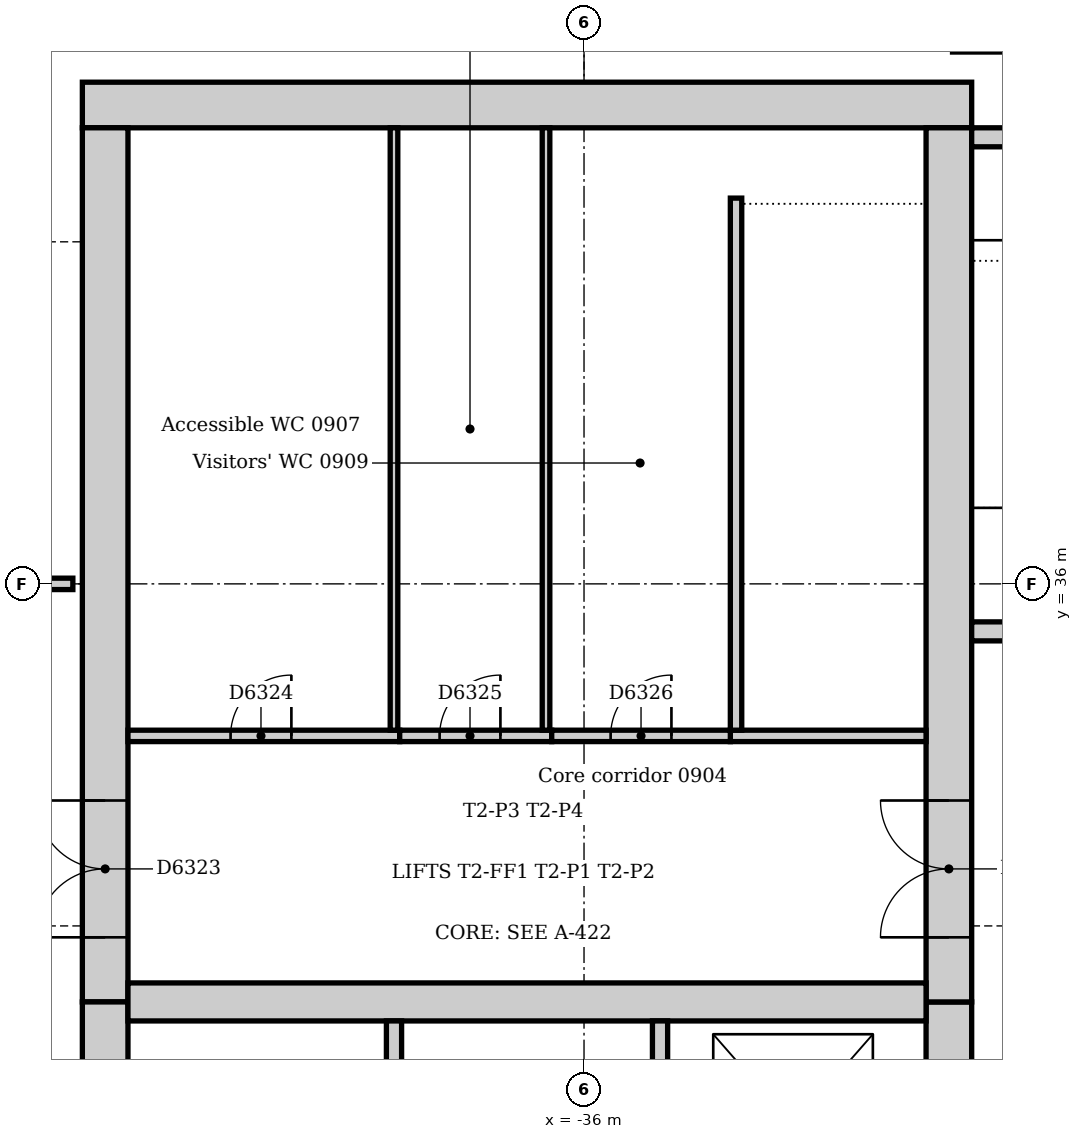
"""IFC4 building model, lengths in metres.
Left out: names, types, materials, properties, quantities, classifications, styles, units other than length and angle.
Written with IfcOpenShell. Run it as: python <this file> out.ifc"""

import sys

from ifc_helpers import new_model, si_unit, direction, frame, frame_2d, origin, origin_2d, place, context, subcontext, project, spatial, rectangle, extrude, element, fill, save


model = new_model("IFC4")
c1 = context("Model", 3, precision=1e-05, world=origin(), true_north=direction((0.0, 1.0)))
c2 = subcontext(c1, "Body", "Model", "MODEL_VIEW")
j1 = project(units=[si_unit("LENGTHUNIT", "METRE"), si_unit("PLANEANGLEUNIT", "RADIAN")], contexts=[c1])
p1 = place(None, origin())
s1 = spatial("IfcSite", under=j1, at=p1, CompositionType="ELEMENT")
p2 = place(p1, origin())
s2 = spatial("IfcBuilding", under=s1, at=p2, CompositionType="ELEMENT")
p3 = place(p2, frame((0.0, 0.0, 42.0)))
s3 = spatial("IfcBuildingStorey", under=s2, at=p3, CompositionType="ELEMENT", Elevation=42.0)
p4 = place(p3, frame((-30.9, 42.3, 0.0), z_axis=(0.0, 0.0, 1.0), x_axis=(-1.0, 0.0, 0.0)))
e1 = element("IfcWall", 1, at=p4, inside=s3, PredefinedType="SOLIDWALL", context=c2, shape_type="SweptSolid", body=[
    extrude(rectangle(XDim=11.7, YDim=0.6, at=frame_2d((5.85, 0.0))), origin(), (0.0, 0.0, 1.0), 4.0),
])
p5 = place(p3, frame((-31.2, 21.0, 0.0), z_axis=(0.0, 0.0, 1.0), x_axis=(0.0, 1.0, 0.0)))
e2 = element("IfcWall", 2, at=p5, inside=s3, PredefinedType="SOLIDWALL", context=c2, shape_type="SweptSolid", body=[
    extrude(rectangle(XDim=9.5, YDim=0.6, at=frame_2d((4.75, 0.0))), origin(), (0.0, 0.0, 1.0), 4.0),
])
p6 = place(p5, frame((5.25, 0.0, 0.0)))
e3 = element("IfcOpeningElement", 3, at=p6, cuts=e2, PredefinedType="OPENING", context=c2, shape_type="SweptSolid", body=[
    extrude(rectangle(XDim=1.0, YDim=2.1, at=frame_2d((0.5, 1.05))), frame((0.0, 0.31, 0.0), z_axis=(0.0, -1.0, 0.0), x_axis=(1.0, 0.0, 0.0)), (0.0, 0.0, 1.0), 0.62),
])
p7 = place(p3, frame((-31.2, 30.5, 0.0), z_axis=(0.0, 0.0, 1.0), x_axis=(0.0, 1.0, 0.0)))
e4 = element("IfcWall", 4, at=p7, inside=s3, PredefinedType="SOLIDWALL", context=c2, shape_type="SweptSolid", body=[
    extrude(rectangle(XDim=11.5, YDim=0.6, at=frame_2d((5.75, 0.0))), origin(), (0.0, 0.0, 1.0), 4.0),
])
p8 = place(p7, frame((0.85, 0.0, 0.0)))
e5 = element("IfcOpeningElement", 5, at=p8, cuts=e4, PredefinedType="OPENING", context=c2, shape_type="SweptSolid", body=[
    extrude(rectangle(XDim=1.8, YDim=2.1, at=frame_2d((0.9, 1.05))), frame((0.0, 0.31, 0.0), z_axis=(0.0, -1.0, 0.0), x_axis=(1.0, 0.0, 0.0)), (0.0, 0.0, 1.0), 0.62),
])
p9 = place(p3, frame((-42.3, 42.0, 0.0), z_axis=(0.0, 0.0, 1.0), x_axis=(0.0, -1.0, 0.0)))
e6 = element("IfcWall", 6, at=p9, inside=s3, PredefinedType="SOLIDWALL", context=c2, shape_type="SweptSolid", body=[
    extrude(rectangle(XDim=11.5, YDim=0.6, at=frame_2d((5.75, 0.0))), origin(), (0.0, 0.0, 1.0), 4.0),
])
p10 = place(p9, frame((8.85, 0.0, 0.0)))
e7 = element("IfcOpeningElement", 7, at=p10, cuts=e6, PredefinedType="OPENING", context=c2, shape_type="SweptSolid", body=[
    extrude(rectangle(XDim=1.8, YDim=2.1, at=frame_2d((0.9, 1.05))), frame((0.0, 0.31, 0.0), z_axis=(0.0, -1.0, 0.0), x_axis=(1.0, 0.0, 0.0)), (0.0, 0.0, 1.0), 0.62),
])
p11 = place(p3, frame((-42.3, 30.5, 0.0), z_axis=(0.0, 0.0, 1.0), x_axis=(0.0, -1.0, 0.0)))
e8 = element("IfcWall", 8, at=p11, inside=s3, PredefinedType="SOLIDWALL", context=c2, shape_type="SweptSolid", body=[
    extrude(rectangle(XDim=9.5, YDim=0.6, at=frame_2d((4.75, 0.0))), origin(), (0.0, 0.0, 1.0), 4.0),
])
p12 = place(p11, frame((3.85, 0.0, 0.0)))
e9 = element("IfcOpeningElement", 9, at=p12, cuts=e8, PredefinedType="OPENING", context=c2, shape_type="SweptSolid", body=[
    extrude(rectangle(XDim=1.8, YDim=2.1, at=frame_2d((0.9, 1.05))), frame((0.0, 0.31, 0.0), z_axis=(0.0, -1.0, 0.0), x_axis=(1.0, 0.0, 0.0)), (0.0, 0.0, 1.0), 0.62),
])
p13 = place(p3, frame((-42.0, 30.5, 0.0), z_axis=(0.0, 0.0, 1.0), x_axis=(1.0, 0.0, 0.0)))
e10 = element("IfcWall", 10, at=p13, inside=s3, PredefinedType="SOLIDWALL", context=c2, shape_type="SweptSolid", body=[
    extrude(rectangle(XDim=10.5, YDim=0.5, at=frame_2d((5.25, 0.0))), origin(), (0.0, 0.0, 1.0), 4.0),
])
p14 = place(p3, frame((-30.9, 35.375, 0.0), z_axis=(0.0, 0.0, 1.0), x_axis=(1.0, 0.0, 0.0)))
e11 = element("IfcWall", 11, at=p14, inside=s3, PredefinedType="SOLIDWALL", context=c2, shape_type="SweptSolid", body=[
    extrude(rectangle(XDim=3.54, YDim=0.25, at=frame_2d((1.77, 0.0))), origin(), (0.0, 0.0, 1.0), 4.0),
])
p15 = place(p14, frame((0.75, 0.0, 0.0)))
e12 = element("IfcOpeningElement", 12, at=p15, cuts=e11, PredefinedType="OPENING", context=c2, shape_type="SweptSolid", body=[
    extrude(rectangle(XDim=1.1, YDim=2.1, at=frame_2d((0.55, 1.05))), frame((0.0, 0.135, 0.0), z_axis=(0.0, -1.0, 0.0), x_axis=(1.0, 0.0, 0.0)), (0.0, 0.0, 1.0), 0.27),
])
p16 = place(p3, frame((-27.36, 41.875, 0.0), z_axis=(0.0, 0.0, 1.0), x_axis=(-1.0, 0.0, 0.0)))
e13 = element("IfcWall", 13, at=p16, inside=s3, PredefinedType="SOLIDWALL", context=c2, shape_type="SweptSolid", body=[
    extrude(rectangle(XDim=3.54, YDim=0.25, at=frame_2d((1.77, 0.0))), origin(), (0.0, 0.0, 1.0), 4.0),
])
p17 = place(p3, frame((-30.602, 43.547, 0.0), z_axis=(0.0, 0.0, 1.0), x_axis=(1.0, 0.0, 0.0)))
e14 = element("IfcColumn", 14, at=p17, inside=s3, PredefinedType="COLUMN", context=c2, shape_type="SweptSolid", body=[
    extrude(rectangle(XDim=1.1, YDim=1.1, at=origin_2d()), origin(), (0.0, 0.0, 1.0), 3.7),
])
for number, where, z_axis, x_axis in (
    (15, (-38.5, 27.4, 0.0), (0.0, 0.0, 1.0), (0.0, 1.0, 0.0)),
    (16, (-35.0, 27.4, 0.0), (0.0, 0.0, 1.0), (0.0, 1.0, 0.0)),
):
    element("IfcWall", number, at=place(p3, frame(where, z_axis=z_axis, x_axis=x_axis)), inside=s3, PredefinedType="SOLIDWALL", context=c2, shape_type="SweptSolid", body=[
        extrude(rectangle(XDim=2.85, YDim=0.2, at=frame_2d((1.425, 0.0))), origin(), (0.0, 0.0, 1.0), 4.0),
    ])
p18 = place(p3, frame((-34.075, 34.0, 0.0), z_axis=(0.0, 0.0, 1.0), x_axis=(1.0, 0.0, 0.0)))
e17 = element("IfcWall", 17, at=p18, inside=s3, PredefinedType="SOLIDWALL", context=c2, shape_type="SweptSolid", body=[
    extrude(rectangle(XDim=2.575, YDim=0.15, at=frame_2d((1.288, 0.0))), origin(), (0.0, 0.0, 1.0), 4.0),
])
p19 = place(p3, frame((-34.0, 41.075, 0.0), z_axis=(0.0, 0.0, 1.0), x_axis=(0.0, -1.0, 0.0)))
e18 = element("IfcWall", 18, at=p19, inside=s3, PredefinedType="SOLIDWALL", context=c2, shape_type="SweptSolid", body=[
    extrude(rectangle(XDim=7.0, YDim=0.15, at=frame_2d((3.5, 0.0))), origin(), (0.0, 0.0, 1.0), 4.0),
])
p20 = place(p3, frame((-38.425, 34.0, 0.0), z_axis=(0.0, 0.0, 1.0), x_axis=(-1.0, 0.0, 0.0)))
e19 = element("IfcWall", 19, at=p20, inside=s3, PredefinedType="PARTITIONING", context=c2, shape_type="SweptSolid", body=[
    extrude(rectangle(XDim=3.575, YDim=0.15, at=frame_2d((1.788, 0.0))), origin(), (0.0, 0.0, 1.0), 3.7),
])
p21 = place(p20, frame((1.425, 0.0, 0.0)))
e20 = element("IfcOpeningElement", 20, at=p21, cuts=e19, PredefinedType="OPENING", context=c2, shape_type="SweptSolid", body=[
    extrude(rectangle(XDim=0.8, YDim=2.1, at=frame_2d((0.4, 1.05))), frame((0.0, 0.085, 0.0), z_axis=(0.0, -1.0, 0.0), x_axis=(1.0, 0.0, 0.0)), (0.0, 0.0, 1.0), 0.17),
])
p22 = place(p3, frame((-36.425, 34.0, 0.0), z_axis=(0.0, 0.0, 1.0), x_axis=(-1.0, 0.0, 0.0)))
e21 = element("IfcWall", 21, at=p22, inside=s3, PredefinedType="PARTITIONING", context=c2, shape_type="SweptSolid", body=[
    extrude(rectangle(XDim=2.0, YDim=0.15, at=frame_2d((1.0, 0.0))), origin(), (0.0, 0.0, 1.0), 3.7),
])
p23 = place(p22, frame((0.675, 0.0, 0.0)))
e22 = element("IfcOpeningElement", 22, at=p23, cuts=e21, PredefinedType="OPENING", context=c2, shape_type="SweptSolid", body=[
    extrude(rectangle(XDim=0.8, YDim=2.1, at=frame_2d((0.4, 1.05))), frame((0.0, 0.085, 0.0), z_axis=(0.0, -1.0, 0.0), x_axis=(1.0, 0.0, 0.0)), (0.0, 0.0, 1.0), 0.17),
])
p24 = place(p3, frame((-34.075, 34.0, 0.0), z_axis=(0.0, 0.0, 1.0), x_axis=(-1.0, 0.0, 0.0)))
e23 = element("IfcWall", 23, at=p24, inside=s3, PredefinedType="PARTITIONING", context=c2, shape_type="SweptSolid", body=[
    extrude(rectangle(XDim=2.35, YDim=0.15, at=frame_2d((1.175, 0.0))), origin(), (0.0, 0.0, 1.0), 3.7),
])
p25 = place(p24, frame((0.775, 0.0, 0.0)))
e24 = element("IfcOpeningElement", 24, at=p25, cuts=e23, PredefinedType="OPENING", context=c2, shape_type="SweptSolid", body=[
    extrude(rectangle(XDim=0.8, YDim=2.1, at=frame_2d((0.4, 1.05))), frame((0.0, 0.085, 0.0), z_axis=(0.0, -1.0, 0.0), x_axis=(1.0, 0.0, 0.0)), (0.0, 0.0, 1.0), 0.17),
])
for number, where, z_axis, x_axis in (
    (25, (-38.5, 34.075, 0.0), (0.0, 0.0, 1.0), (0.0, 1.0, 0.0)),
    (26, (-36.5, 34.075, 0.0), (0.0, 0.0, 1.0), (0.0, 1.0, 0.0)),
):
    element("IfcWall", number, at=place(p3, frame(where, z_axis=z_axis, x_axis=x_axis)), inside=s3, PredefinedType="PARTITIONING", context=c2, shape_type="SweptSolid", body=[
        extrude(rectangle(XDim=7.925, YDim=0.1, at=frame_2d((3.962, 0.0))), origin(), (0.0, 0.0, 1.0), 3.7),
    ])
p26 = place(p3, frame((-44.6, 36.0, 0.0), z_axis=(0.0, 0.0, 1.0), x_axis=(1.0, 0.0, 0.0)))
e27 = element("IfcWall", 27, at=p26, inside=s3, PredefinedType="PARTITIONING", context=c2, shape_type="SweptSolid", body=[
    extrude(rectangle(XDim=1.875, YDim=0.15, at=frame_2d((0.938, 0.0))), origin(), (0.0, 0.0, 1.0), 3.452),
])
p27 = place(p26, frame((0.5, 0.0, 0.0)))
e28 = element("IfcOpeningElement", 28, at=p27, cuts=e27, PredefinedType="OPENING", context=c2, shape_type="SweptSolid", body=[
    extrude(rectangle(XDim=0.9, YDim=2.1, at=frame_2d((0.45, 1.05))), frame((0.0, 0.085, 0.0), z_axis=(0.0, -1.0, 0.0), x_axis=(1.0, 0.0, 0.0)), (0.0, 0.0, 1.0), 0.17),
])
p28 = place(p8, origin())
e29 = element("IfcDoor", 29, at=p28, inside=s3, OperationType="DOUBLE_DOOR_SINGLE_SWING", PredefinedType="DOOR", context=c2, shape_type="SweptSolid", body=[
    extrude(rectangle(XDim=1.8, YDim=2.1, at=frame_2d((0.9, 1.05))), frame((0.0, 0.025, 0.0), z_axis=(0.0, -1.0, 0.0), x_axis=(1.0, 0.0, 0.0)), (0.0, 0.0, 1.0), 0.05),
])
fill(e5, e29)
p29 = place(p10, frame((1.8, 0.0, 0.0), z_axis=(0.0, 0.0, 1.0), x_axis=(-1.0, 0.0, 0.0)))
e30 = element("IfcDoor", 30, at=p29, inside=s3, OperationType="DOUBLE_DOOR_SINGLE_SWING", PredefinedType="DOOR", context=c2, shape_type="SweptSolid", body=[
    extrude(rectangle(XDim=1.8, YDim=2.1, at=frame_2d((0.9, 1.05))), frame((0.0, 0.025, 0.0), z_axis=(0.0, -1.0, 0.0), x_axis=(1.0, 0.0, 0.0)), (0.0, 0.0, 1.0), 0.05),
])
fill(e7, e30)
p30 = place(p21, frame((0.8, 0.0, 0.0), z_axis=(0.0, 0.0, 1.0), x_axis=(-1.0, 0.0, 0.0)))
e31 = element("IfcDoor", 31, at=p30, inside=s3, OperationType="SINGLE_SWING_RIGHT", PredefinedType="DOOR", context=c2, shape_type="SweptSolid", body=[
    extrude(rectangle(XDim=0.8, YDim=2.1, at=frame_2d((0.4, 1.05))), frame((0.0, 0.025, 0.0), z_axis=(0.0, -1.0, 0.0), x_axis=(1.0, 0.0, 0.0)), (0.0, 0.0, 1.0), 0.05),
])
fill(e20, e31)
p31 = place(p23, frame((0.8, 0.0, 0.0), z_axis=(0.0, 0.0, 1.0), x_axis=(-1.0, 0.0, 0.0)))
e32 = element("IfcDoor", 32, at=p31, inside=s3, OperationType="SINGLE_SWING_RIGHT", PredefinedType="DOOR", context=c2, shape_type="SweptSolid", body=[
    extrude(rectangle(XDim=0.8, YDim=2.1, at=frame_2d((0.4, 1.05))), frame((0.0, 0.025, 0.0), z_axis=(0.0, -1.0, 0.0), x_axis=(1.0, 0.0, 0.0)), (0.0, 0.0, 1.0), 0.05),
])
fill(e22, e32)
p32 = place(p25, frame((0.8, 0.0, 0.0), z_axis=(0.0, 0.0, 1.0), x_axis=(-1.0, 0.0, 0.0)))
e33 = element("IfcDoor", 33, at=p32, inside=s3, OperationType="SINGLE_SWING_RIGHT", PredefinedType="DOOR", context=c2, shape_type="SweptSolid", body=[
    extrude(rectangle(XDim=0.8, YDim=2.1, at=frame_2d((0.4, 1.05))), frame((0.0, 0.025, 0.0), z_axis=(0.0, -1.0, 0.0), x_axis=(1.0, 0.0, 0.0)), (0.0, 0.0, 1.0), 0.05),
])
fill(e24, e33)
save(model, sys.argv[1])
